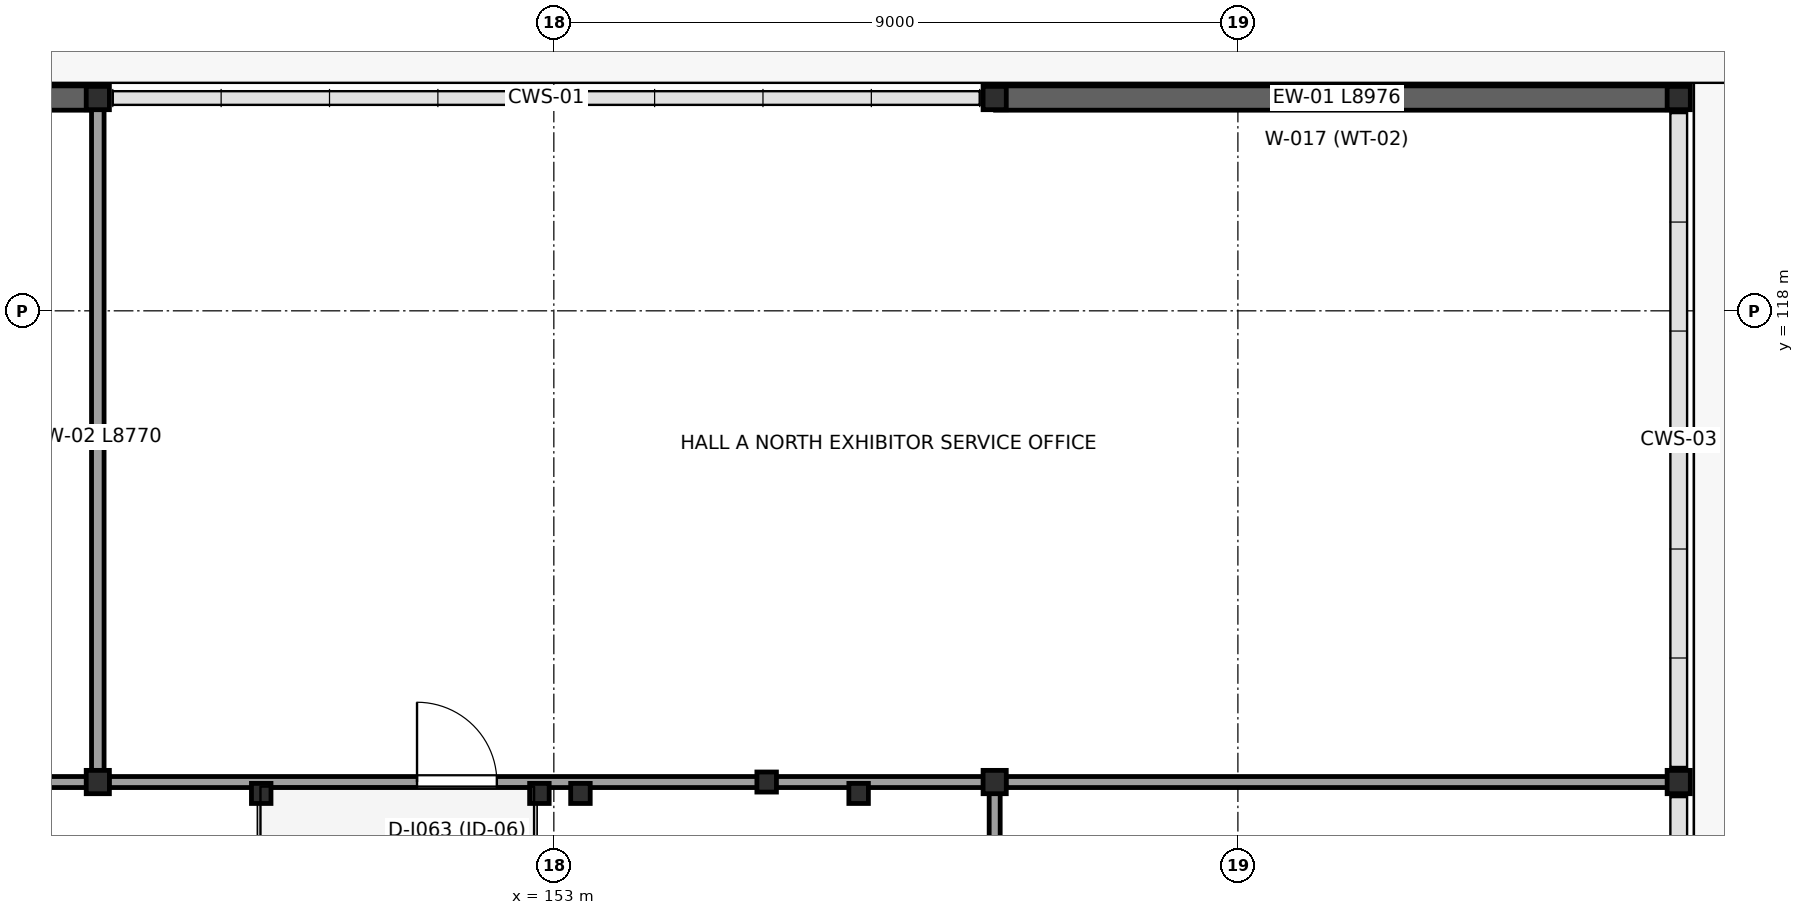
"""IFC4 building model, lengths in metres.
Left out: names, types, materials, properties, quantities, classifications, styles, units other than length and angle.
Written with IfcOpenShell. Run it as: python <this file> out.ifc"""

import sys

from ifc_helpers import new_model, si_unit, direction, frame, frame_2d, origin, origin_2d, place, context, subcontext, project, spatial, rectangle, i_section, extrude, element, fill, save


model = new_model("IFC4")
c1 = context("Model", 3, precision=1e-05, world=origin(), true_north=direction((0.0, 1.0)))
c2 = subcontext(c1, "Body", "Model", "MODEL_VIEW")
j1 = project(units=[si_unit("LENGTHUNIT", "METRE"), si_unit("PLANEANGLEUNIT", "RADIAN")], contexts=[c1])
p1 = place(None, origin())
s1 = spatial("IfcSite", under=j1, at=p1, CompositionType="ELEMENT")
p2 = place(p1, origin())
s2 = spatial("IfcBuilding", under=s1, at=p2, CompositionType="ELEMENT")
p3 = place(p2, origin())
s3 = spatial("IfcBuildingStorey", under=s2, at=p3, CompositionType="ELEMENT", Elevation=0.0)
for number, where, z_axis, x_axis in (
    (1, (147.0, 111.8, 0.0), (0.0, 0.0, 1.0), (1.0, 0.0, 0.0)),
    (2, (147.0, 120.8, 0.0), (0.0, 0.0, 1.0), (1.0, 0.0, 0.0)),
    (3, (158.8, 111.8, 0.0), (0.0, 0.0, 1.0), (1.0, 0.0, 0.0)),
    (4, (158.8, 120.8, 0.0), (0.0, 0.0, 1.0), (1.0, 0.0, 0.0)),
    (5, (167.8, 111.8, 0.0), (0.0, 0.0, 1.0), (1.0, 0.0, 0.0)),
    (6, (167.8, 120.8, 0.0), (0.0, 0.0, 1.0), (1.0, 0.0, 0.0)),
):
    element("IfcColumn", number, at=place(p3, frame(where, z_axis=z_axis, x_axis=x_axis)), inside=s3, PredefinedType="COLUMN", context=c2, shape_type="SweptSolid", body=[
        extrude(i_section(OverallWidth=0.305, OverallDepth=0.307, WebThickness=0.01, FlangeThickness=0.015, at=origin_2d()), origin(), (0.0, 0.0, 1.0), 6.0),
    ])
p4 = place(p3, frame((155.8, 111.8, 0.0), z_axis=(0.0, 0.0, 1.0), x_axis=(1.0, 0.0, 0.0)))
e7 = element("IfcColumn", 7, at=p4, inside=s3, PredefinedType="COLUMN", context=c2, shape_type="SweptSolid", body=[
    extrude(i_section(OverallWidth=0.257, OverallDepth=0.264, WebThickness=0.012, FlangeThickness=0.02, at=origin_2d()), origin(), (0.0, 0.0, 1.0), 6.0),
])
for number, where, z_axis, x_axis in (
    (8, (149.15, 111.65, 0.0), (0.0, 0.0, 1.0), (1.0, 0.0, 0.0)),
    (9, (152.81, 111.65, 0.0), (0.0, 0.0, 1.0), (1.0, 0.0, 0.0)),
):
    element("IfcColumn", number, at=place(p3, frame(where, z_axis=z_axis, x_axis=x_axis)), inside=s3, PredefinedType="COLUMN", context=c2, shape_type="SweptSolid", body=[
        extrude(i_section(OverallWidth=0.257, OverallDepth=0.264, WebThickness=0.012, FlangeThickness=0.02, at=origin_2d()), origin(), (0.0, 0.0, 1.0), 2.8),
    ])
for number, where, z_axis, x_axis in (
    (10, (153.35, 111.65, 0.0), (0.0, 0.0, 1.0), (1.0, 0.0, 0.0)),
    (11, (157.01, 111.65, 0.0), (0.0, 0.0, 1.0), (1.0, 0.0, 0.0)),
):
    element("IfcColumn", number, at=place(p3, frame(where, z_axis=z_axis, x_axis=x_axis)), inside=s3, PredefinedType="COLUMN", context=c2, shape_type="SweptSolid", body=[
        extrude(i_section(OverallWidth=0.257, OverallDepth=0.264, WebThickness=0.012, FlangeThickness=0.02, at=origin_2d()), origin(), (0.0, 0.0, 1.0), 6.0),
    ])
p5 = place(p3, frame((138.012, 120.8, 0.0), z_axis=(0.0, 0.0, 1.0), x_axis=(1.0, 0.0, 0.0)))
e12 = element("IfcWall", 12, at=p5, inside=s3, PredefinedType="STANDARD", context=c2, shape_type="SweptSolid", body=[
    extrude(rectangle(XDim=8.976, YDim=0.32, at=frame_2d((4.488, 0.0))), origin(), (0.0, 0.0, 1.0), 5.78),
])
p6 = place(p5, frame((3.288, 0.0, 0.0)))
e13 = element("IfcOpeningElement", 13, at=p6, cuts=e12, PredefinedType="OPENING", context=c2, shape_type="SweptSolid", body=[
    extrude(rectangle(XDim=2.4, YDim=2.6, at=frame_2d((1.2, 1.3))), frame((0.0, 0.17, 0.0), z_axis=(0.0, -1.0, 0.0), x_axis=(1.0, 0.0, 0.0)), (0.0, 0.0, 1.0), 0.34),
])
p7 = place(p3, frame((158.812, 120.8, 0.0), z_axis=(0.0, 0.0, 1.0), x_axis=(1.0, 0.0, 0.0)))
e14 = element("IfcWall", 14, at=p7, inside=s3, PredefinedType="STANDARD", context=c2, shape_type="SweptSolid", body=[
    extrude(rectangle(XDim=8.976, YDim=0.32, at=frame_2d((4.488, 0.0))), origin(), (0.0, 0.0, 1.0), 5.78),
])
p8 = place(p7, frame((3.663, 0.0, 1.1)))
e15 = element("IfcOpeningElement", 15, at=p8, cuts=e14, PredefinedType="OPENING", context=c2, shape_type="SweptSolid", body=[
    extrude(rectangle(XDim=1.65, YDim=1.8, at=frame_2d((0.825, 0.9))), frame((0.0, 0.17, 0.0), z_axis=(0.0, -1.0, 0.0), x_axis=(1.0, 0.0, 0.0)), (0.0, 0.0, 1.0), 0.34),
])
p9 = place(p3, frame((138.147, 111.8, 0.0), z_axis=(0.0, 0.0, 1.0), x_axis=(1.0, 0.0, 0.0)))
e16 = element("IfcWall", 16, at=p9, inside=s3, PredefinedType="PARTITIONING", context=c2, shape_type="SweptSolid", body=[
    extrude(rectangle(XDim=8.706, YDim=0.145, at=frame_2d((4.353, 0.0))), origin(), (0.0, 0.0, 1.0), 5.2),
])
p10 = place(p9, frame((3.863, 0.0, 0.0)))
e17 = element("IfcOpeningElement", 17, at=p10, cuts=e16, PredefinedType="OPENING", context=c2, shape_type="SweptSolid", body=[
    extrude(rectangle(XDim=0.98, YDim=2.15, at=frame_2d((0.49, 1.075))), frame((0.0, 0.083, 0.0), z_axis=(0.0, -1.0, 0.0), x_axis=(1.0, 0.0, 0.0)), (0.0, 0.0, 1.0), 0.165),
])
p11 = place(p9, frame((1.2, 0.0, 0.0)))
e18 = element("IfcOpeningElement", 18, at=p11, cuts=e16, PredefinedType="OPENING", context=c2, shape_type="SweptSolid", body=[
    extrude(rectangle(XDim=1.05, YDim=2.18, at=frame_2d((0.525, 1.09))), frame((0.0, 0.083, 0.0), z_axis=(0.0, -1.0, 0.0), x_axis=(1.0, 0.0, 0.0)), (0.0, 0.0, 1.0), 0.165),
])
p12 = place(p3, frame((147.147, 111.8, 0.0), z_axis=(0.0, 0.0, 1.0), x_axis=(1.0, 0.0, 0.0)))
e19 = element("IfcWall", 19, at=p12, inside=s3, PredefinedType="PARTITIONING", context=c2, shape_type="SweptSolid", body=[
    extrude(rectangle(XDim=11.506, YDim=0.145, at=frame_2d((5.753, 0.0))), origin(), (0.0, 0.0, 1.0), 5.2),
])
p13 = place(p12, frame((4.053, 0.0, 0.0)))
e20 = element("IfcOpeningElement", 20, at=p13, cuts=e19, PredefinedType="OPENING", context=c2, shape_type="SweptSolid", body=[
    extrude(rectangle(XDim=1.05, YDim=2.18, at=frame_2d((0.525, 1.09))), frame((0.0, 0.083, 0.0), z_axis=(0.0, -1.0, 0.0), x_axis=(1.0, 0.0, 0.0)), (0.0, 0.0, 1.0), 0.165),
])
p14 = place(p3, frame((158.947, 111.8, 0.0), z_axis=(0.0, 0.0, 1.0), x_axis=(1.0, 0.0, 0.0)))
e21 = element("IfcWall", 21, at=p14, inside=s3, PredefinedType="PARTITIONING", context=c2, shape_type="SweptSolid", body=[
    extrude(rectangle(XDim=8.706, YDim=0.145, at=frame_2d((4.353, 0.0))), origin(), (0.0, 0.0, 1.0), 5.2),
])
p15 = place(p3, frame((147.0, 111.95, 0.0), z_axis=(0.0, 0.0, 1.0), x_axis=(0.0, 1.0, 0.0)))
e22 = element("IfcWall", 22, at=p15, inside=s3, PredefinedType="PARTITIONING", context=c2, shape_type="SweptSolid", body=[
    extrude(rectangle(XDim=8.77, YDim=0.165, at=frame_2d((4.385, 0.0))), origin(), (0.0, 0.0, 1.0), 5.2),
])
p16 = place(p3, frame((158.8, 103.127, 0.0), z_axis=(0.0, 0.0, 1.0), x_axis=(0.0, 1.0, 0.0)))
e23 = element("IfcWall", 23, at=p16, inside=s3, PredefinedType="PARTITIONING", context=c2, shape_type="SweptSolid", body=[
    extrude(rectangle(XDim=8.525, YDim=0.145, at=frame_2d((4.263, 0.0))), origin(), (0.0, 0.0, 1.0), 5.2),
])
p17 = place(p8, origin())
e24 = element("IfcWindow", 24, at=p17, inside=s3, PartitioningType="SINGLE_PANEL", PredefinedType="WINDOW", context=c2, shape_type="SweptSolid", body=[
    extrude(rectangle(XDim=1.65, YDim=1.8, at=frame_2d((0.825, 0.9))), frame((0.0, 0.03, 0.0), z_axis=(0.0, -1.0, 0.0), x_axis=(1.0, 0.0, 0.0)), (0.0, 0.0, 1.0), 0.06),
])
fill(e15, e24)
p18 = place(p13, origin())
e25 = element("IfcDoor", 25, at=p18, inside=s3, OperationType="SINGLE_SWING_LEFT", PredefinedType="DOOR", context=c2, shape_type="SweptSolid", body=[
    extrude(rectangle(XDim=1.05, YDim=2.18, at=frame_2d((0.525, 1.09))), frame((0.0, 0.025, 0.0), z_axis=(0.0, -1.0, 0.0), x_axis=(1.0, 0.0, 0.0)), (0.0, 0.0, 1.0), 0.05),
])
fill(e20, e25)
save(model, sys.argv[1])
